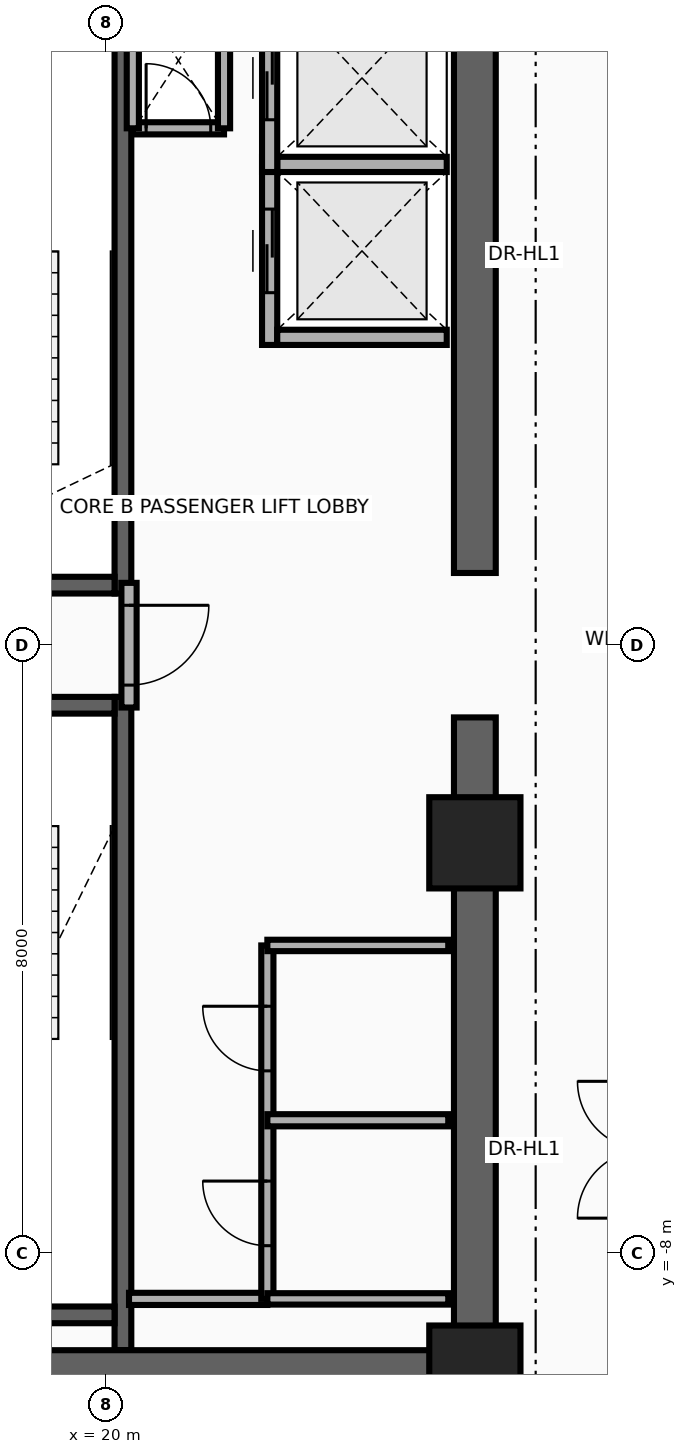
"""IFC4 building model, lengths in metres.
Left out: names, types, materials, properties, quantities, classifications, styles, units other than length and angle.
Written with IfcOpenShell. Run it as: python <this file> out.ifc"""

import sys

from ifc_helpers import new_model, si_unit, direction, frame, frame_2d, origin, origin_2d, place, context, subcontext, project, spatial, rectangle, extrude, source, transform, mapped, element, fill, save


model = new_model("IFC4")
c1 = context("Model", 3, precision=1e-05, world=origin(), true_north=direction((0.0, 1.0)))
c2 = subcontext(c1, "Body", "Model", "MODEL_VIEW")
j1 = project(units=[si_unit("LENGTHUNIT", "METRE"), si_unit("PLANEANGLEUNIT", "RADIAN")], contexts=[c1])
p1 = place(None, origin())
s1 = spatial("IfcSite", under=j1, at=p1, CompositionType="ELEMENT")
p2 = place(p1, origin())
s2 = spatial("IfcBuilding", under=s1, at=p2, CompositionType="ELEMENT")
p3 = place(p2, frame((0.0, 0.0, 161.2)))
s3 = spatial("IfcBuildingStorey", under=s2, at=p3, CompositionType="ELEMENT", Elevation=161.2)
p4 = place(p3, frame((20.22, 0.68, 0.0), z_axis=(0.0, 0.0, 1.0), x_axis=(0.0, 1.0, 0.0)))
e1 = element("IfcWall", 1, at=p4, inside=s3, PredefinedType="SHEAR", context=c2, shape_type="SweptSolid", body=[
    extrude(rectangle(XDim=8.595, YDim=0.22, at=frame_2d((4.297, 0.0))), origin(), (0.0, 0.0, 1.0), 3.46),
])
p5 = place(p3, frame((17.0, 0.79, 0.0), z_axis=(0.0, 0.0, 1.0), x_axis=(1.0, 0.0, 0.0)))
e2 = element("IfcWall", 2, at=p5, inside=s3, PredefinedType="SHEAR", context=c2, shape_type="SweptSolid", body=[
    extrude(rectangle(XDim=3.11, YDim=0.22, at=frame_2d((1.555, 0.0))), origin(), (0.0, 0.0, 1.0), 3.46),
])
p6 = place(p5, frame((0.95, 0.0, 0.0)))
e3 = element("IfcOpeningElement", 3, at=p6, cuts=e2, PredefinedType="OPENING", context=c2, shape_type="SweptSolid", body=[
    extrude(rectangle(XDim=1.1, YDim=2.15, at=frame_2d((0.55, 1.075))), frame((0.0, 0.125, 0.0), z_axis=(0.0, -1.0, 0.0), x_axis=(1.0, 0.0, 0.0)), (0.0, 0.0, 1.0), 0.25),
])
p7 = place(p3, frame((20.22, -9.275, 0.0), z_axis=(0.0, 0.0, 1.0), x_axis=(0.0, 1.0, 0.0)))
e4 = element("IfcWall", 4, at=p7, inside=s3, PredefinedType="SHEAR", context=c2, shape_type="SweptSolid", body=[
    extrude(rectangle(XDim=8.595, YDim=0.22, at=frame_2d((4.297, 0.0))), origin(), (0.0, 0.0, 1.0), 3.46),
])
p8 = place(p3, frame((17.0, -8.81, 0.0), z_axis=(0.0, 0.0, 1.0), x_axis=(1.0, 0.0, 0.0)))
e5 = element("IfcWall", 5, at=p8, inside=s3, PredefinedType="SHEAR", context=c2, shape_type="SweptSolid", body=[
    extrude(rectangle(XDim=3.11, YDim=0.22, at=frame_2d((1.555, 0.0))), origin(), (0.0, 0.0, 1.0), 3.46),
])
p9 = place(p3, frame((17.0, -0.79, 0.0), z_axis=(0.0, 0.0, 1.0), x_axis=(1.0, 0.0, 0.0)))
e6 = element("IfcWall", 6, at=p9, inside=s3, PredefinedType="SHEAR", context=c2, shape_type="SweptSolid", body=[
    extrude(rectangle(XDim=3.11, YDim=0.22, at=frame_2d((1.555, 0.0))), origin(), (0.0, 0.0, 1.0), 3.46),
])
p10 = place(p9, frame((0.95, 0.0, 0.0)))
e7 = element("IfcOpeningElement", 7, at=p10, cuts=e6, PredefinedType="OPENING", context=c2, shape_type="SweptSolid", body=[
    extrude(rectangle(XDim=1.1, YDim=2.15, at=frame_2d((0.55, 1.075))), frame((0.0, 0.125, 0.0), z_axis=(0.0, -1.0, 0.0), x_axis=(1.0, 0.0, 0.0)), (0.0, 0.0, 1.0), 0.25),
])
for number, where, z_axis, x_axis in (
    (8, (24.85, -9.825, 0.0), (0.0, 0.0, 1.0), (0.0, 1.0, 0.0)),
    (9, (24.85, 0.95, 0.0), (0.0, 0.0, 1.0), (0.0, 1.0, 0.0)),
):
    element("IfcWall", number, at=place(p3, frame(where, z_axis=z_axis, x_axis=x_axis)), inside=s3, PredefinedType="SHEAR", context=c2, shape_type="SweptSolid", body=[
        extrude(rectangle(XDim=8.875, YDim=0.55, at=frame_2d((4.438, 0.0))), origin(), (0.0, 0.0, 1.0), 3.46),
    ])
p11 = place(p3, frame((15.85, -9.55, 0.0), z_axis=(0.0, 0.0, 1.0), x_axis=(1.0, 0.0, 0.0)))
e10 = element("IfcWall", 10, at=p11, inside=s3, PredefinedType="SHEAR", context=c2, shape_type="SweptSolid", body=[
    extrude(rectangle(XDim=9.0, YDim=0.55, at=frame_2d((4.5, 0.0))), origin(), (0.0, 0.0, 1.0), 3.46),
])
m1 = source(origin(), c2, "Body", "SweptSolid", [
    extrude(rectangle(XDim=1.2, YDim=1.2, at=origin_2d()), origin(), (0.0, 0.0, 1.0), 3.7),
])
for number, where, z_axis, x_axis in (
    (11, (24.85, -9.55, 0.0), (0.0, 0.0, 1.0), (1.0, 0.0, 0.0)),
    (12, (24.85, -2.6, 0.0), (0.0, 0.0, 1.0), (1.0, 0.0, 0.0)),
):
    element("IfcColumn", number, at=place(p3, frame(where, z_axis=z_axis, x_axis=x_axis)), inside=s3, PredefinedType="COLUMN", context=c2, shape_type="MappedRepresentation", body=[
        mapped(m1, transform((0.0, 0.0, 0.0), x_axis=(1.0, 0.0, 0.0), y_axis=(0.0, 1.0, 0.0), z_axis=(0.0, 0.0, 1.0), scale=1.0)),
    ])
p12 = place(p3, frame((22.15, 3.95, 0.0), z_axis=(0.0, 0.0, 1.0), x_axis=(0.0, 1.0, 0.0)))
e13 = element("IfcWall", 13, at=p12, inside=s3, PredefinedType="MOVABLE", context=c2, shape_type="SweptSolid", body=[
    extrude(rectangle(XDim=2.475, YDim=0.2, at=frame_2d((1.238, 0.0))), origin(), (0.0, 0.0, 1.0), 3.46),
])
p13 = place(p12, frame((0.688, 0.0, 0.0)))
e14 = element("IfcOpeningElement", 14, at=p13, cuts=e13, PredefinedType="OPENING", context=c2, shape_type="SweptSolid", body=[
    extrude(rectangle(XDim=1.1, YDim=2.1, at=frame_2d((0.55, 1.05))), frame((0.0, 0.115, 0.0), z_axis=(0.0, -1.0, 0.0), x_axis=(1.0, 0.0, 0.0)), (0.0, 0.0, 1.0), 0.23),
])
for number, where, z_axis, x_axis in (
    (15, (22.25, 4.05, 0.0), (0.0, 0.0, 1.0), (1.0, 0.0, 0.0)),
    (16, (22.25, 6.325, 0.0), (0.0, 0.0, 1.0), (1.0, 0.0, 0.0)),
):
    element("IfcWall", number, at=place(p3, frame(where, z_axis=z_axis, x_axis=x_axis)), inside=s3, PredefinedType="MOVABLE", context=c2, shape_type="SweptSolid", body=[
        extrude(rectangle(XDim=2.23, YDim=0.2, at=frame_2d((1.115, 0.0))), origin(), (0.0, 0.0, 1.0), 3.46),
    ])
p14 = place(p3, frame((22.15, 6.225, 0.0), z_axis=(0.0, 0.0, 1.0), x_axis=(0.0, 1.0, 0.0)))
e17 = element("IfcWall", 17, at=p14, inside=s3, PredefinedType="MOVABLE", context=c2, shape_type="SweptSolid", body=[
    extrude(rectangle(XDim=2.475, YDim=0.2, at=frame_2d((1.237, 0.0))), origin(), (0.0, 0.0, 1.0), 3.46),
])
p15 = place(p14, frame((0.688, 0.0, 0.0)))
e18 = element("IfcOpeningElement", 18, at=p15, cuts=e17, PredefinedType="OPENING", context=c2, shape_type="SweptSolid", body=[
    extrude(rectangle(XDim=1.1, YDim=2.1, at=frame_2d((0.55, 1.05))), frame((0.0, 0.115, 0.0), z_axis=(0.0, -1.0, 0.0), x_axis=(1.0, 0.0, 0.0)), (0.0, 0.0, 1.0), 0.23),
])
p16 = place(p3, frame((20.3, -0.82, 0.0), z_axis=(0.0, 0.0, 1.0), x_axis=(0.0, 1.0, 0.0)))
e19 = element("IfcWall", 19, at=p16, inside=s3, PredefinedType="PARTITIONING", context=c2, shape_type="SweptSolid", body=[
    extrude(rectangle(XDim=1.64, YDim=0.2, at=frame_2d((0.82, 0.0))), origin(), (0.0, 0.0, 1.0), 3.46),
])
p17 = place(p16, frame((0.295, 0.0, 0.0)))
e20 = element("IfcOpeningElement", 20, at=p17, cuts=e19, PredefinedType="OPENING", context=c2, shape_type="SweptSolid", body=[
    extrude(rectangle(XDim=1.05, YDim=2.15, at=frame_2d((0.525, 1.075))), frame((0.0, 0.115, 0.0), z_axis=(0.0, -1.0, 0.0), x_axis=(1.0, 0.0, 0.0)), (0.0, 0.0, 1.0), 0.23),
])
p18 = place(p3, frame((20.35, 6.8, 0.0), z_axis=(0.0, 0.0, 1.0), x_axis=(1.0, 0.0, 0.0)))
e21 = element("IfcWall", 21, at=p18, inside=s3, PredefinedType="PARTITIONING", context=c2, shape_type="SweptSolid", body=[
    extrude(rectangle(XDim=1.2, YDim=0.16, at=frame_2d((0.6, 0.0))), origin(), (0.0, 0.0, 1.0), 3.46),
])
p19 = place(p18, frame((0.175, 0.0, 0.0)))
e22 = element("IfcOpeningElement", 22, at=p19, cuts=e21, PredefinedType="OPENING", context=c2, shape_type="SweptSolid", body=[
    extrude(rectangle(XDim=0.85, YDim=2.05, at=frame_2d((0.425, 1.025))), frame((0.0, 0.095, 0.0), z_axis=(0.0, -1.0, 0.0), x_axis=(1.0, 0.0, 0.0)), (0.0, 0.0, 1.0), 0.19),
])
for number, where, z_axis, x_axis in (
    (23, (21.55, 6.8, 0.0), (0.0, 0.0, 1.0), (0.0, 1.0, 0.0)),
    (24, (20.35, 6.8, 0.0), (0.0, 0.0, 1.0), (0.0, 1.0, 0.0)),
):
    element("IfcWall", number, at=place(p3, frame(where, z_axis=z_axis, x_axis=x_axis)), inside=s3, PredefinedType="PARTITIONING", context=c2, shape_type="SweptSolid", body=[
        extrude(rectangle(XDim=1.8, YDim=0.16, at=frame_2d((0.9, 0.0))), origin(), (0.0, 0.0, 1.0), 3.46),
    ])
p20 = place(p3, frame((20.3, -8.6, 0.0), z_axis=(0.0, 0.0, 1.0), x_axis=(1.0, 0.0, 0.0)))
e25 = element("IfcWall", 25, at=p20, inside=s3, PredefinedType="PARTITIONING", context=c2, shape_type="SweptSolid", body=[
    extrude(rectangle(XDim=1.82, YDim=0.16, at=frame_2d((0.91, 0.0))), origin(), (0.0, 0.0, 1.0), 3.46),
])
p21 = place(p3, frame((22.12, -8.6, 0.0), z_axis=(0.0, 0.0, 1.0), x_axis=(0.0, 1.0, 0.0)))
e26 = element("IfcWall", 26, at=p21, inside=s3, PredefinedType="PARTITIONING", context=c2, shape_type="SweptSolid", body=[
    extrude(rectangle(XDim=4.65, YDim=0.16, at=frame_2d((2.325, 0.0))), origin(), (0.0, 0.0, 1.0), 3.46),
])
p22 = place(p21, frame((0.7, 0.0, 0.0)))
e27 = element("IfcOpeningElement", 27, at=p22, cuts=e26, PredefinedType="OPENING", context=c2, shape_type="SweptSolid", body=[
    extrude(rectangle(XDim=0.85, YDim=2.05, at=frame_2d((0.425, 1.025))), frame((0.0, 0.095, 0.0), z_axis=(0.0, -1.0, 0.0), x_axis=(1.0, 0.0, 0.0)), (0.0, 0.0, 1.0), 0.19),
])
p23 = place(p21, frame((3.0, 0.0, 0.0)))
e28 = element("IfcOpeningElement", 28, at=p23, cuts=e26, PredefinedType="OPENING", context=c2, shape_type="SweptSolid", body=[
    extrude(rectangle(XDim=0.85, YDim=2.05, at=frame_2d((0.425, 1.025))), frame((0.0, 0.095, 0.0), z_axis=(0.0, -1.0, 0.0), x_axis=(1.0, 0.0, 0.0)), (0.0, 0.0, 1.0), 0.19),
])
for number, where, z_axis, x_axis in (
    (29, (22.12, -3.95, 0.0), (0.0, 0.0, 1.0), (1.0, 0.0, 0.0)),
    (30, (22.12, -8.6, 0.0), (0.0, 0.0, 1.0), (1.0, 0.0, 0.0)),
):
    element("IfcWall", number, at=place(p3, frame(where, z_axis=z_axis, x_axis=x_axis)), inside=s3, PredefinedType="PARTITIONING", context=c2, shape_type="SweptSolid", body=[
        extrude(rectangle(XDim=2.38, YDim=0.15, at=frame_2d((1.19, 0.0))), origin(), (0.0, 0.0, 1.0), 3.46),
    ])
p24 = place(p3, frame((22.12, -6.25, 0.0), z_axis=(0.0, 0.0, 1.0), x_axis=(1.0, 0.0, 0.0)))
e31 = element("IfcWall", 31, at=p24, inside=s3, PredefinedType="PARTITIONING", context=c2, shape_type="SweptSolid", body=[
    extrude(rectangle(XDim=2.38, YDim=0.16, at=frame_2d((1.19, 0.0))), origin(), (0.0, 0.0, 1.0), 3.46),
])
p25 = place(p13, origin())
e32 = element("IfcDoor", 32, at=p25, inside=s3, OperationType="DOUBLE_DOOR_SLIDING", PredefinedType="DOOR", context=c2, shape_type="SweptSolid", body=[
    extrude(rectangle(XDim=1.1, YDim=2.1, at=frame_2d((0.55, 1.05))), frame((0.0, 0.025, 0.0), z_axis=(0.0, -1.0, 0.0), x_axis=(1.0, 0.0, 0.0)), (0.0, 0.0, 1.0), 0.05),
])
fill(e14, e32)
p26 = place(p15, origin())
e33 = element("IfcDoor", 33, at=p26, inside=s3, OperationType="DOUBLE_DOOR_SLIDING", PredefinedType="DOOR", context=c2, shape_type="SweptSolid", body=[
    extrude(rectangle(XDim=1.1, YDim=2.1, at=frame_2d((0.55, 1.05))), frame((0.0, 0.025, 0.0), z_axis=(0.0, -1.0, 0.0), x_axis=(1.0, 0.0, 0.0)), (0.0, 0.0, 1.0), 0.05),
])
fill(e18, e33)
p27 = place(p17, frame((1.05, 0.0, 0.0), z_axis=(0.0, 0.0, 1.0), x_axis=(-1.0, 0.0, 0.0)))
e34 = element("IfcDoor", 34, at=p27, inside=s3, OperationType="SINGLE_SWING_LEFT", PredefinedType="DOOR", context=c2, shape_type="SweptSolid", body=[
    extrude(rectangle(XDim=1.05, YDim=2.15, at=frame_2d((0.525, 1.075))), frame((0.0, 0.025, 0.0), z_axis=(0.0, -1.0, 0.0), x_axis=(1.0, 0.0, 0.0)), (0.0, 0.0, 1.0), 0.05),
])
fill(e20, e34)
p28 = place(p19, origin())
e35 = element("IfcDoor", 35, at=p28, inside=s3, OperationType="SINGLE_SWING_RIGHT", PredefinedType="DOOR", context=c2, shape_type="SweptSolid", body=[
    extrude(rectangle(XDim=0.85, YDim=2.05, at=frame_2d((0.425, 1.025))), frame((0.0, 0.025, 0.0), z_axis=(0.0, -1.0, 0.0), x_axis=(1.0, 0.0, 0.0)), (0.0, 0.0, 1.0), 0.05),
])
fill(e22, e35)
p29 = place(p22, origin())
e36 = element("IfcDoor", 36, at=p29, inside=s3, OperationType="SINGLE_SWING_LEFT", PredefinedType="DOOR", context=c2, shape_type="SweptSolid", body=[
    extrude(rectangle(XDim=0.85, YDim=2.05, at=frame_2d((0.425, 1.025))), frame((0.0, 0.025, 0.0), z_axis=(0.0, -1.0, 0.0), x_axis=(1.0, 0.0, 0.0)), (0.0, 0.0, 1.0), 0.05),
])
fill(e27, e36)
p30 = place(p23, origin())
e37 = element("IfcDoor", 37, at=p30, inside=s3, OperationType="SINGLE_SWING_RIGHT", PredefinedType="DOOR", context=c2, shape_type="SweptSolid", body=[
    extrude(rectangle(XDim=0.85, YDim=2.05, at=frame_2d((0.425, 1.025))), frame((0.0, 0.025, 0.0), z_axis=(0.0, -1.0, 0.0), x_axis=(1.0, 0.0, 0.0)), (0.0, 0.0, 1.0), 0.05),
])
fill(e28, e37)
save(model, sys.argv[1])
